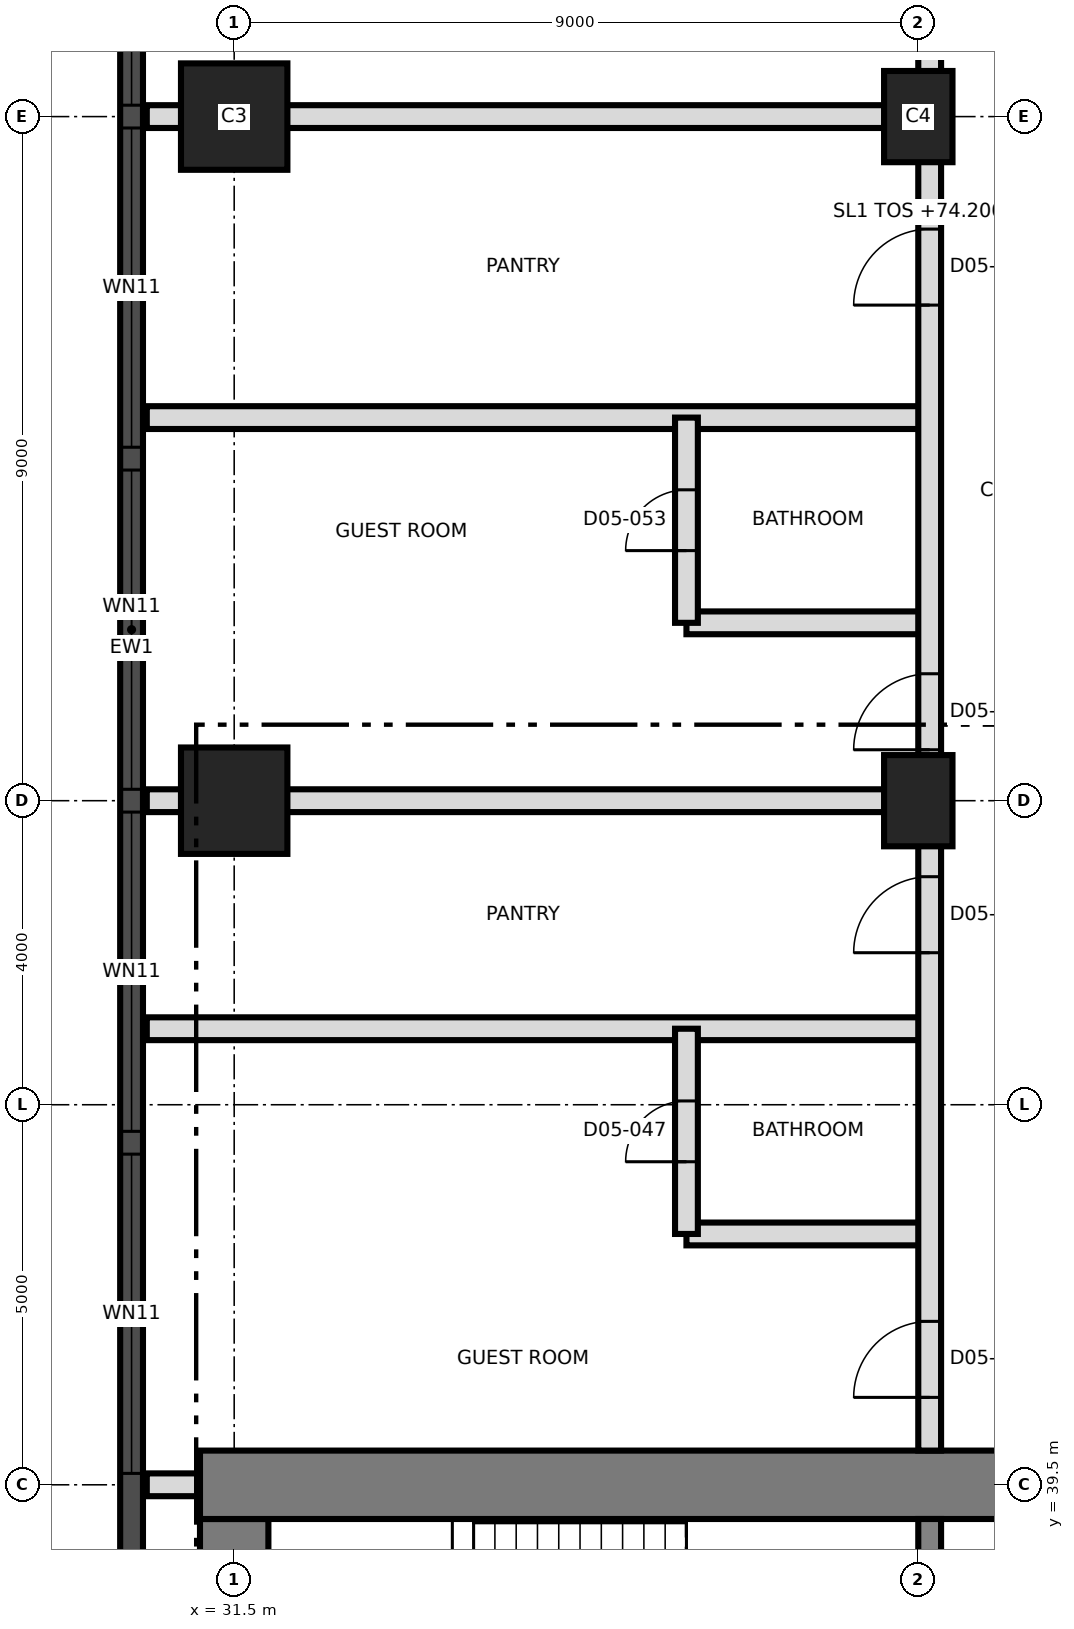
"""IFC4 building model, lengths in metres.
Left out: names, types, materials, properties, quantities, classifications, styles, units other than length and angle.
Written with IfcOpenShell. Run it as: python <this file> out.ifc"""

import sys

from ifc_helpers import new_model, si_unit, direction, frame, frame_2d, origin, origin_2d, place, context, subcontext, project, spatial, rectangle, extrude, element, fill, save


model = new_model("IFC4")
c1 = context("Model", 3, precision=1e-05, world=origin(), true_north=direction((0.0, 1.0)))
c2 = subcontext(c1, "Body", "Model", "MODEL_VIEW")
j1 = project(units=[si_unit("LENGTHUNIT", "METRE"), si_unit("PLANEANGLEUNIT", "RADIAN")], contexts=[c1])
p1 = place(None, origin())
s1 = spatial("IfcSite", under=j1, at=p1, CompositionType="ELEMENT")
p2 = place(p1, origin())
s2 = spatial("IfcBuilding", under=s1, at=p2, CompositionType="ELEMENT")
p3 = place(p2, frame((0.0, 0.0, 74.2)))
s3 = spatial("IfcBuildingStorey", under=s2, at=p3, CompositionType="ELEMENT", Elevation=74.2)
p4 = place(p3, frame((31.5, 21.95, 0.0), z_axis=(0.0, 0.0, 1.0), x_axis=(0.0, 1.0, 0.0)))
e1 = element("IfcWall", 1, at=p4, inside=s3, PredefinedType="SHEAR", context=c2, shape_type="SweptSolid", body=[
    extrude(rectangle(XDim=17.1, YDim=0.9, at=frame_2d((8.55, 0.0))), origin(), (0.0, 0.0, 1.0), 3.7),
])
p5 = place(p3, frame((31.05, 39.5, 0.0), z_axis=(0.0, 0.0, 1.0), x_axis=(1.0, 0.0, 0.0)))
e2 = element("IfcWall", 2, at=p5, inside=s3, PredefinedType="SHEAR", context=c2, shape_type="SweptSolid", body=[
    extrude(rectangle(XDim=27.0, YDim=0.9, at=frame_2d((13.5, 0.0))), origin(), (0.0, 0.0, 1.0), 3.7),
])
p6 = place(p5, frame((10.65, 0.0, 0.0)))
e3 = element("IfcOpeningElement", 3, at=p6, cuts=e2, PredefinedType="OPENING", context=c2, shape_type="SweptSolid", body=[
    extrude(rectangle(XDim=1.2, YDim=2.1, at=frame_2d((0.6, 1.05))), frame((0.0, 0.46, 0.0), z_axis=(0.0, -1.0, 0.0), x_axis=(1.0, 0.0, 0.0)), (0.0, 0.0, 1.0), 0.92),
])
p7 = place(p3, frame((40.65, 33.5, 0.0), z_axis=(0.0, 0.0, 1.0), x_axis=(0.0, 1.0, 0.0)))
e4 = element("IfcWall", 4, at=p7, inside=s3, PredefinedType="SHEAR", context=c2, shape_type="SweptSolid", body=[
    extrude(rectangle(XDim=5.55, YDim=0.3, at=frame_2d((2.775, 0.0))), origin(), (0.0, 0.0, 1.0), 3.7),
])
p8 = place(p3, frame((31.5, 48.5, 0.0), z_axis=(0.0, 0.0, 1.0), x_axis=(1.0, 0.0, 0.0)))
e5 = element("IfcColumn", 5, at=p8, inside=s3, PredefinedType="COLUMN", context=c2, shape_type="SweptSolid", body=[
    extrude(rectangle(XDim=1.4, YDim=1.4, at=origin_2d()), origin(), (0.0, 0.0, 1.0), 3.7),
])
p9 = place(p3, frame((40.5, 48.5, 0.0), z_axis=(0.0, 0.0, 1.0), x_axis=(0.0, 1.0, 0.0)))
e6 = element("IfcColumn", 6, at=p9, inside=s3, PredefinedType="COLUMN", context=c2, shape_type="SweptSolid", body=[
    extrude(rectangle(XDim=1.2, YDim=0.9, at=origin_2d()), origin(), (0.0, 0.0, 1.0), 3.7),
])
p10 = place(p3, frame((31.5, 57.5, 0.0), z_axis=(0.0, 0.0, 1.0), x_axis=(1.0, 0.0, 0.0)))
e7 = element("IfcColumn", 7, at=p10, inside=s3, PredefinedType="COLUMN", context=c2, shape_type="SweptSolid", body=[
    extrude(rectangle(XDim=1.4, YDim=1.4, at=origin_2d()), origin(), (0.0, 0.0, 1.0), 3.7),
])
p11 = place(p3, frame((40.5, 57.5, 0.0), z_axis=(0.0, 0.0, 1.0), x_axis=(0.0, 1.0, 0.0)))
e8 = element("IfcColumn", 8, at=p11, inside=s3, PredefinedType="COLUMN", context=c2, shape_type="SweptSolid", body=[
    extrude(rectangle(XDim=1.2, YDim=0.9, at=origin_2d()), origin(), (0.0, 0.0, 1.0), 3.7),
])
p12 = place(p3, frame((30.15, 66.992, 0.0), z_axis=(0.0, 0.0, 1.0), x_axis=(0.0, -1.0, 0.0)))
e9 = element("IfcWall", 9, at=p12, inside=s3, PredefinedType="SOLIDWALL", context=c2, shape_type="SweptSolid", body=[
    extrude(rectangle(XDim=32.968, YDim=0.3, at=frame_2d((16.484, 0.0))), origin(), (0.0, 0.0, 1.0), 3.4),
])
p13 = place(p12, frame((1.596, 0.0, 0.3)))
e10 = element("IfcOpeningElement", 10, at=p13, cuts=e9, PredefinedType="OPENING", context=c2, shape_type="SweptSolid", body=[
    extrude(rectangle(XDim=1.8, YDim=2.4, at=frame_2d((0.9, 1.2))), frame((0.0, 0.16, 0.0), z_axis=(0.0, -1.0, 0.0), x_axis=(1.0, 0.0, 0.0)), (0.0, 0.0, 1.0), 0.32),
])
p14 = place(p12, frame((5.142, 0.0, 0.9)))
e11 = element("IfcOpeningElement", 11, at=p14, cuts=e9, PredefinedType="OPENING", context=c2, shape_type="SweptSolid", body=[
    extrude(rectangle(XDim=4.2, YDim=1.5, at=frame_2d((2.1, 0.75))), frame((0.0, 0.16, 0.0), z_axis=(0.0, -1.0, 0.0), x_axis=(1.0, 0.0, 0.0)), (0.0, 0.0, 1.0), 0.32),
])
p15 = place(p12, frame((9.642, 0.0, 0.9)))
e12 = element("IfcOpeningElement", 12, at=p15, cuts=e9, PredefinedType="OPENING", context=c2, shape_type="SweptSolid", body=[
    extrude(rectangle(XDim=4.2, YDim=1.5, at=frame_2d((2.1, 0.75))), frame((0.0, 0.16, 0.0), z_axis=(0.0, -1.0, 0.0), x_axis=(1.0, 0.0, 0.0)), (0.0, 0.0, 1.0), 0.32),
])
p16 = place(p12, frame((14.142, 0.0, 0.9)))
e13 = element("IfcOpeningElement", 13, at=p16, cuts=e9, PredefinedType="OPENING", context=c2, shape_type="SweptSolid", body=[
    extrude(rectangle(XDim=4.2, YDim=1.5, at=frame_2d((2.1, 0.75))), frame((0.0, 0.16, 0.0), z_axis=(0.0, -1.0, 0.0), x_axis=(1.0, 0.0, 0.0)), (0.0, 0.0, 1.0), 0.32),
])
p17 = place(p12, frame((18.642, 0.0, 0.9)))
e14 = element("IfcOpeningElement", 14, at=p17, cuts=e9, PredefinedType="OPENING", context=c2, shape_type="SweptSolid", body=[
    extrude(rectangle(XDim=4.2, YDim=1.5, at=frame_2d((2.1, 0.75))), frame((0.0, 0.16, 0.0), z_axis=(0.0, -1.0, 0.0), x_axis=(1.0, 0.0, 0.0)), (0.0, 0.0, 1.0), 0.32),
])
p18 = place(p12, frame((23.142, 0.0, 0.9)))
e15 = element("IfcOpeningElement", 15, at=p18, cuts=e9, PredefinedType="OPENING", context=c2, shape_type="SweptSolid", body=[
    extrude(rectangle(XDim=4.2, YDim=1.5, at=frame_2d((2.1, 0.75))), frame((0.0, 0.16, 0.0), z_axis=(0.0, -1.0, 0.0), x_axis=(1.0, 0.0, 0.0)), (0.0, 0.0, 1.0), 0.32),
])
p19 = place(p12, frame((29.33, 0.0, 0.3)))
e16 = element("IfcOpeningElement", 16, at=p19, cuts=e9, PredefinedType="OPENING", context=c2, shape_type="SweptSolid", body=[
    extrude(rectangle(XDim=1.8, YDim=2.4, at=frame_2d((0.9, 1.2))), frame((0.0, 0.16, 0.0), z_axis=(0.0, -1.0, 0.0), x_axis=(1.0, 0.0, 0.0)), (0.0, 0.0, 1.0), 0.32),
])
p20 = place(p3, frame((30.35, 39.5, 0.0), z_axis=(0.0, 0.0, 1.0), x_axis=(1.0, 0.0, 0.0)))
e17 = element("IfcWall", 17, at=p20, inside=s3, PredefinedType="PARTITIONING", context=c2, shape_type="SweptSolid", body=[
    extrude(rectangle(XDim=0.68, YDim=0.3, at=frame_2d((0.34, 0.0))), origin(), (0.0, 0.0, 1.0), 3.4),
])
p21 = place(p3, frame((37.45, 42.8, 0.0), z_axis=(0.0, 0.0, 1.0), x_axis=(1.0, 0.0, 0.0)))
e18 = element("IfcWall", 18, at=p21, inside=s3, PredefinedType="PARTITIONING", context=c2, shape_type="SweptSolid", body=[
    extrude(rectangle(XDim=3.2, YDim=0.3, at=frame_2d((1.6, 0.0))), origin(), (0.0, 0.0, 1.0), 3.4),
])
for number, where, z_axis, x_axis in (
    (19, (30.35, 45.5, 0.0), (0.0, 0.0, 1.0), (1.0, 0.0, 0.0)),
    (20, (30.35, 48.5, 0.0), (0.0, 0.0, 1.0), (1.0, 0.0, 0.0)),
):
    element("IfcWall", number, at=place(p3, frame(where, z_axis=z_axis, x_axis=x_axis)), inside=s3, PredefinedType="PARTITIONING", context=c2, shape_type="SweptSolid", body=[
        extrude(rectangle(XDim=10.3, YDim=0.3, at=frame_2d((5.15, 0.0))), origin(), (0.0, 0.0, 1.0), 3.4),
    ])
p22 = place(p3, frame((37.45, 50.84, 0.0), z_axis=(0.0, 0.0, 1.0), x_axis=(1.0, 0.0, 0.0)))
e21 = element("IfcWall", 21, at=p22, inside=s3, PredefinedType="PARTITIONING", context=c2, shape_type="SweptSolid", body=[
    extrude(rectangle(XDim=3.2, YDim=0.3, at=frame_2d((1.6, 0.0))), origin(), (0.0, 0.0, 1.0), 3.4),
])
for number, where, z_axis, x_axis in (
    (22, (30.35, 53.54, 0.0), (0.0, 0.0, 1.0), (1.0, 0.0, 0.0)),
    (23, (30.35, 57.5, 0.0), (0.0, 0.0, 1.0), (1.0, 0.0, 0.0)),
):
    element("IfcWall", number, at=place(p3, frame(where, z_axis=z_axis, x_axis=x_axis)), inside=s3, PredefinedType="PARTITIONING", context=c2, shape_type="SweptSolid", body=[
        extrude(rectangle(XDim=10.3, YDim=0.3, at=frame_2d((5.15, 0.0))), origin(), (0.0, 0.0, 1.0), 3.4),
    ])
p23 = place(p3, frame((37.45, 42.8, 0.0), z_axis=(0.0, 0.0, 1.0), x_axis=(0.0, 1.0, 0.0)))
e24 = element("IfcWall", 24, at=p23, inside=s3, PredefinedType="PARTITIONING", context=c2, shape_type="SweptSolid", body=[
    extrude(rectangle(XDim=2.7, YDim=0.3, at=frame_2d((1.35, 0.0))), origin(), (0.0, 0.0, 1.0), 3.4),
])
p24 = place(p23, frame((0.95, 0.0, 0.0)))
e25 = element("IfcOpeningElement", 25, at=p24, cuts=e24, PredefinedType="OPENING", context=c2, shape_type="SweptSolid", body=[
    extrude(rectangle(XDim=0.8, YDim=2.1, at=frame_2d((0.4, 1.05))), frame((0.0, 0.16, 0.0), z_axis=(0.0, -1.0, 0.0), x_axis=(1.0, 0.0, 0.0)), (0.0, 0.0, 1.0), 0.32),
])
p25 = place(p3, frame((37.45, 50.84, 0.0), z_axis=(0.0, 0.0, 1.0), x_axis=(0.0, 1.0, 0.0)))
e26 = element("IfcWall", 26, at=p25, inside=s3, PredefinedType="PARTITIONING", context=c2, shape_type="SweptSolid", body=[
    extrude(rectangle(XDim=2.7, YDim=0.3, at=frame_2d((1.35, 0.0))), origin(), (0.0, 0.0, 1.0), 3.4),
])
p26 = place(p25, frame((0.95, 0.0, 0.0)))
e27 = element("IfcOpeningElement", 27, at=p26, cuts=e26, PredefinedType="OPENING", context=c2, shape_type="SweptSolid", body=[
    extrude(rectangle(XDim=0.8, YDim=2.1, at=frame_2d((0.4, 1.05))), frame((0.0, 0.16, 0.0), z_axis=(0.0, -1.0, 0.0), x_axis=(1.0, 0.0, 0.0)), (0.0, 0.0, 1.0), 0.32),
])
p27 = place(p3, frame((40.65, 39.95, 0.0), z_axis=(0.0, 0.0, 1.0), x_axis=(0.0, 1.0, 0.0)))
e28 = element("IfcWall", 28, at=p27, inside=s3, PredefinedType="PARTITIONING", context=c2, shape_type="SweptSolid", body=[
    extrude(rectangle(XDim=36.94, YDim=0.3, at=frame_2d((18.47, 0.0))), origin(), (0.0, 0.0, 1.0), 3.4),
])
p28 = place(p27, frame((0.7, 0.0, 0.0)))
e29 = element("IfcOpeningElement", 29, at=p28, cuts=e28, PredefinedType="OPENING", context=c2, shape_type="SweptSolid", body=[
    extrude(rectangle(XDim=1.0, YDim=2.1, at=frame_2d((0.5, 1.05))), frame((0.0, 0.16, 0.0), z_axis=(0.0, -1.0, 0.0), x_axis=(1.0, 0.0, 0.0)), (0.0, 0.0, 1.0), 0.32),
])
p29 = place(p27, frame((6.55, 0.0, 0.0)))
e30 = element("IfcOpeningElement", 30, at=p29, cuts=e28, PredefinedType="OPENING", context=c2, shape_type="SweptSolid", body=[
    extrude(rectangle(XDim=1.0, YDim=2.1, at=frame_2d((0.5, 1.05))), frame((0.0, 0.16, 0.0), z_axis=(0.0, -1.0, 0.0), x_axis=(1.0, 0.0, 0.0)), (0.0, 0.0, 1.0), 0.32),
])
p30 = place(p27, frame((9.22, 0.0, 0.0)))
e31 = element("IfcOpeningElement", 31, at=p30, cuts=e28, PredefinedType="OPENING", context=c2, shape_type="SweptSolid", body=[
    extrude(rectangle(XDim=1.0, YDim=2.1, at=frame_2d((0.5, 1.05))), frame((0.0, 0.16, 0.0), z_axis=(0.0, -1.0, 0.0), x_axis=(1.0, 0.0, 0.0)), (0.0, 0.0, 1.0), 0.32),
])
p31 = place(p27, frame((15.07, 0.0, 0.0)))
e32 = element("IfcOpeningElement", 32, at=p31, cuts=e28, PredefinedType="OPENING", context=c2, shape_type="SweptSolid", body=[
    extrude(rectangle(XDim=1.0, YDim=2.1, at=frame_2d((0.5, 1.05))), frame((0.0, 0.16, 0.0), z_axis=(0.0, -1.0, 0.0), x_axis=(1.0, 0.0, 0.0)), (0.0, 0.0, 1.0), 0.32),
])
p32 = place(p27, frame((21.05, 0.0, 0.0)))
e33 = element("IfcOpeningElement", 33, at=p32, cuts=e28, PredefinedType="OPENING", context=c2, shape_type="SweptSolid", body=[
    extrude(rectangle(XDim=1.0, YDim=2.4, at=frame_2d((0.5, 1.2))), frame((0.0, 0.16, 0.0), z_axis=(0.0, -1.0, 0.0), x_axis=(1.0, 0.0, 0.0)), (0.0, 0.0, 1.0), 0.32),
])
p33 = place(p14, origin())
e34 = element("IfcWindow", 34, at=p33, inside=s3, PartitioningType="SINGLE_PANEL", PredefinedType="WINDOW", context=c2, shape_type="SweptSolid", body=[
    extrude(rectangle(XDim=4.2, YDim=1.5, at=frame_2d((2.1, 0.75))), frame((0.0, 0.03, 0.0), z_axis=(0.0, -1.0, 0.0), x_axis=(1.0, 0.0, 0.0)), (0.0, 0.0, 1.0), 0.06),
])
fill(e11, e34)
p34 = place(p15, origin())
e35 = element("IfcWindow", 35, at=p34, inside=s3, PartitioningType="SINGLE_PANEL", PredefinedType="WINDOW", context=c2, shape_type="SweptSolid", body=[
    extrude(rectangle(XDim=4.2, YDim=1.5, at=frame_2d((2.1, 0.75))), frame((0.0, 0.03, 0.0), z_axis=(0.0, -1.0, 0.0), x_axis=(1.0, 0.0, 0.0)), (0.0, 0.0, 1.0), 0.06),
])
fill(e12, e35)
p35 = place(p16, origin())
e36 = element("IfcWindow", 36, at=p35, inside=s3, PartitioningType="SINGLE_PANEL", PredefinedType="WINDOW", context=c2, shape_type="SweptSolid", body=[
    extrude(rectangle(XDim=4.2, YDim=1.5, at=frame_2d((2.1, 0.75))), frame((0.0, 0.03, 0.0), z_axis=(0.0, -1.0, 0.0), x_axis=(1.0, 0.0, 0.0)), (0.0, 0.0, 1.0), 0.06),
])
fill(e13, e36)
p36 = place(p17, origin())
e37 = element("IfcWindow", 37, at=p36, inside=s3, PartitioningType="SINGLE_PANEL", PredefinedType="WINDOW", context=c2, shape_type="SweptSolid", body=[
    extrude(rectangle(XDim=4.2, YDim=1.5, at=frame_2d((2.1, 0.75))), frame((0.0, 0.03, 0.0), z_axis=(0.0, -1.0, 0.0), x_axis=(1.0, 0.0, 0.0)), (0.0, 0.0, 1.0), 0.06),
])
fill(e14, e37)
p37 = place(p18, origin())
e38 = element("IfcWindow", 38, at=p37, inside=s3, PartitioningType="SINGLE_PANEL", PredefinedType="WINDOW", context=c2, shape_type="SweptSolid", body=[
    extrude(rectangle(XDim=4.2, YDim=1.5, at=frame_2d((2.1, 0.75))), frame((0.0, 0.03, 0.0), z_axis=(0.0, -1.0, 0.0), x_axis=(1.0, 0.0, 0.0)), (0.0, 0.0, 1.0), 0.06),
])
fill(e15, e38)
p38 = place(p24, origin())
e39 = element("IfcDoor", 39, at=p38, inside=s3, OperationType="SINGLE_SWING_LEFT", PredefinedType="DOOR", context=c2, shape_type="SweptSolid", body=[
    extrude(rectangle(XDim=0.8, YDim=2.1, at=frame_2d((0.4, 1.05))), frame((0.0, 0.025, 0.0), z_axis=(0.0, -1.0, 0.0), x_axis=(1.0, 0.0, 0.0)), (0.0, 0.0, 1.0), 0.05),
])
fill(e25, e39)
p39 = place(p28, origin())
e40 = element("IfcDoor", 40, at=p39, inside=s3, OperationType="SINGLE_SWING_LEFT", PredefinedType="DOOR", context=c2, shape_type="SweptSolid", body=[
    extrude(rectangle(XDim=1.0, YDim=2.1, at=frame_2d((0.5, 1.05))), frame((0.0, 0.025, 0.0), z_axis=(0.0, -1.0, 0.0), x_axis=(1.0, 0.0, 0.0)), (0.0, 0.0, 1.0), 0.05),
])
fill(e29, e40)
p40 = place(p29, origin())
e41 = element("IfcDoor", 41, at=p40, inside=s3, OperationType="SINGLE_SWING_RIGHT", PredefinedType="DOOR", context=c2, shape_type="SweptSolid", body=[
    extrude(rectangle(XDim=1.0, YDim=2.1, at=frame_2d((0.5, 1.05))), frame((0.0, 0.025, 0.0), z_axis=(0.0, -1.0, 0.0), x_axis=(1.0, 0.0, 0.0)), (0.0, 0.0, 1.0), 0.05),
])
fill(e30, e41)
p41 = place(p26, origin())
e42 = element("IfcDoor", 42, at=p41, inside=s3, OperationType="SINGLE_SWING_LEFT", PredefinedType="DOOR", context=c2, shape_type="SweptSolid", body=[
    extrude(rectangle(XDim=0.8, YDim=2.1, at=frame_2d((0.4, 1.05))), frame((0.0, 0.025, 0.0), z_axis=(0.0, -1.0, 0.0), x_axis=(1.0, 0.0, 0.0)), (0.0, 0.0, 1.0), 0.05),
])
fill(e27, e42)
p42 = place(p30, origin())
e43 = element("IfcDoor", 43, at=p42, inside=s3, OperationType="SINGLE_SWING_LEFT", PredefinedType="DOOR", context=c2, shape_type="SweptSolid", body=[
    extrude(rectangle(XDim=1.0, YDim=2.1, at=frame_2d((0.5, 1.05))), frame((0.0, 0.025, 0.0), z_axis=(0.0, -1.0, 0.0), x_axis=(1.0, 0.0, 0.0)), (0.0, 0.0, 1.0), 0.05),
])
fill(e31, e43)
p43 = place(p31, origin())
e44 = element("IfcDoor", 44, at=p43, inside=s3, OperationType="SINGLE_SWING_RIGHT", PredefinedType="DOOR", context=c2, shape_type="SweptSolid", body=[
    extrude(rectangle(XDim=1.0, YDim=2.1, at=frame_2d((0.5, 1.05))), frame((0.0, 0.025, 0.0), z_axis=(0.0, -1.0, 0.0), x_axis=(1.0, 0.0, 0.0)), (0.0, 0.0, 1.0), 0.05),
])
fill(e32, e44)
save(model, sys.argv[1])
